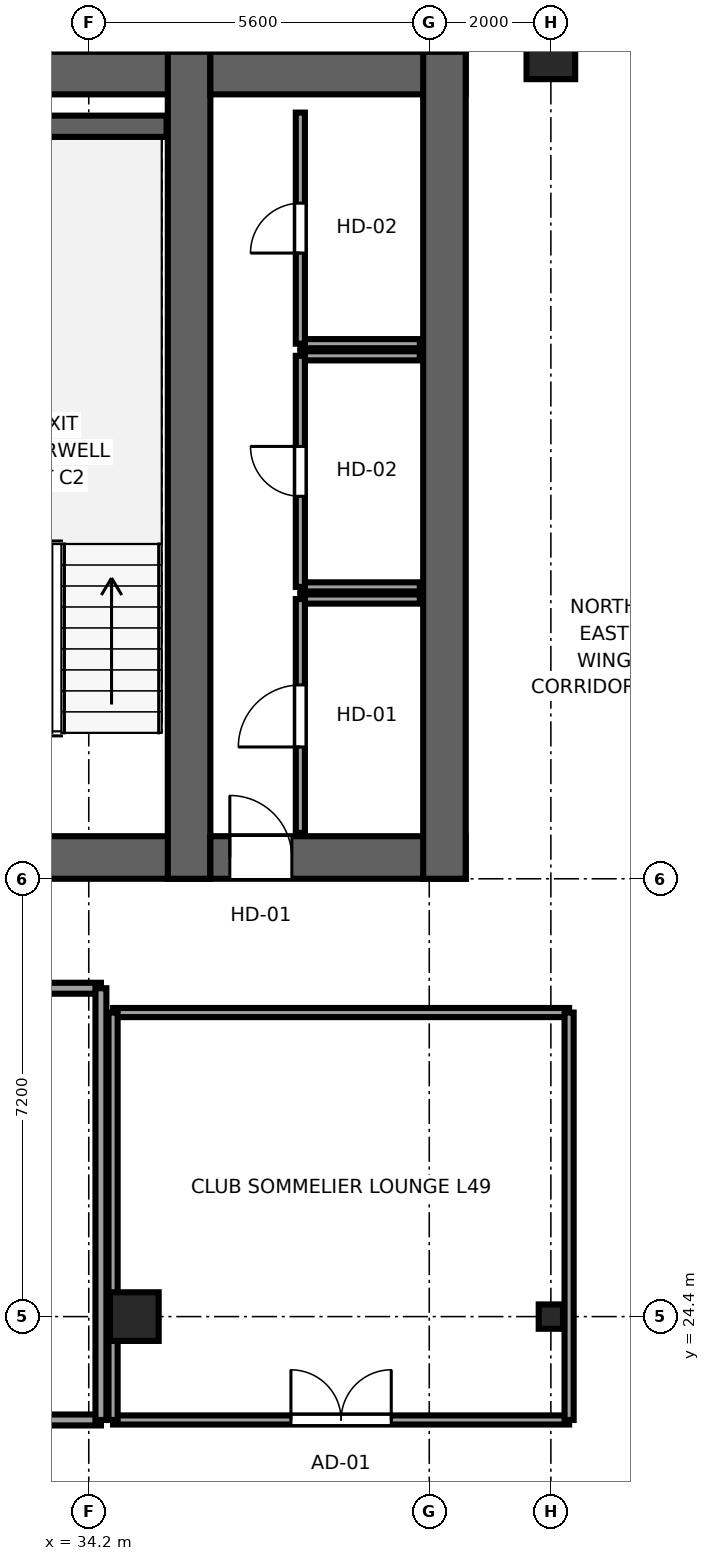
"""IFC4 building model, lengths in metres.
Left out: names, types, materials, properties, quantities, classifications, styles, units other than length and angle.
Written with IfcOpenShell. Run it as: python <this file> out.ifc"""

import sys

from ifc_helpers import new_model, si_unit, direction, frame, frame_2d, origin, origin_2d, place, context, subcontext, project, spatial, rectangle, i_section, extrude, source, transform, mapped, element, fill, save


model = new_model("IFC4")
c1 = context("Model", 3, precision=1e-05, world=origin(), true_north=direction((0.0, 1.0)))
c2 = subcontext(c1, "Body", "Model", "MODEL_VIEW")
j1 = project(units=[si_unit("LENGTHUNIT", "METRE"), si_unit("PLANEANGLEUNIT", "RADIAN")], contexts=[c1])
p1 = place(None, origin())
s1 = spatial("IfcSite", under=j1, at=p1, CompositionType="ELEMENT")
p2 = place(p1, origin())
s2 = spatial("IfcBuilding", under=s1, at=p2, CompositionType="ELEMENT")
p3 = place(p2, frame((0.0, 0.0, 187.55)))
s3 = spatial("IfcBuildingStorey", under=s2, at=p3, CompositionType="ELEMENT", Elevation=187.55)
p4 = place(p3, frame((9.8, 31.95, 0.0), z_axis=(0.0, 0.0, 1.0), x_axis=(1.0, 0.0, 0.0)))
e1 = element("IfcWall", 1, at=p4, inside=s3, PredefinedType="SHEAR", context=c2, shape_type="SweptSolid", body=[
    extrude(rectangle(XDim=26.4, YDim=0.7, at=frame_2d((13.2, 0.0))), origin(), (0.0, 0.0, 1.0), 3.55),
])
p5 = place(p4, frame((6.32, 0.0, 0.0), z_axis=(0.0, 0.0, 1.0), x_axis=(-1.0, 0.0, 0.0)))
e2 = element("IfcOpeningElement", 2, at=p5, cuts=e1, PredefinedType="OPENING", context=c2, shape_type="SweptSolid", body=[
    extrude(rectangle(XDim=1.5, YDim=2.04, at=frame_2d((0.75, 1.02))), frame((0.0, 0.36, 0.0), z_axis=(0.0, -1.0, 0.0), x_axis=(1.0, 0.0, 0.0)), (0.0, 0.0, 1.0), 0.72),
])
p6 = place(p4, frame((13.95, 0.0, 0.0), z_axis=(0.0, 0.0, 1.0), x_axis=(-1.0, 0.0, 0.0)))
e3 = element("IfcOpeningElement", 3, at=p6, cuts=e1, PredefinedType="OPENING", context=c2, shape_type="SweptSolid", body=[
    extrude(rectangle(XDim=1.5, YDim=2.04, at=frame_2d((0.75, 1.02))), frame((0.0, 0.36, 0.0), z_axis=(0.0, -1.0, 0.0), x_axis=(1.0, 0.0, 0.0)), (0.0, 0.0, 1.0), 0.72),
])
p7 = place(p4, frame((20.25, 0.0, 0.0), z_axis=(0.0, 0.0, 1.0), x_axis=(-1.0, 0.0, 0.0)))
e4 = element("IfcOpeningElement", 4, at=p7, cuts=e1, PredefinedType="OPENING", context=c2, shape_type="SweptSolid", body=[
    extrude(rectangle(XDim=1.5, YDim=2.04, at=frame_2d((0.75, 1.02))), frame((0.0, 0.36, 0.0), z_axis=(0.0, -1.0, 0.0), x_axis=(1.0, 0.0, 0.0)), (0.0, 0.0, 1.0), 0.72),
])
p8 = place(p4, frame((8.37, 0.0, 0.0), z_axis=(0.0, 0.0, 1.0), x_axis=(-1.0, 0.0, 0.0)))
e5 = element("IfcOpeningElement", 5, at=p8, cuts=e1, PredefinedType="OPENING", context=c2, shape_type="SweptSolid", body=[
    extrude(rectangle(XDim=0.82, YDim=2.01, at=frame_2d((0.41, 1.005))), frame((0.0, 0.36, 0.0), z_axis=(0.0, -1.0, 0.0), x_axis=(1.0, 0.0, 0.0)), (0.0, 0.0, 1.0), 0.72),
])
p9 = place(p3, frame((9.8, 44.85, 0.0), z_axis=(0.0, 0.0, 1.0), x_axis=(1.0, 0.0, 0.0)))
e6 = element("IfcWall", 6, at=p9, inside=s3, PredefinedType="SHEAR", context=c2, shape_type="SweptSolid", body=[
    extrude(rectangle(XDim=26.4, YDim=0.7, at=frame_2d((13.2, 0.0))), origin(), (0.0, 0.0, 1.0), 3.55),
])
p10 = place(p3, frame((35.85, 31.6, 0.0), z_axis=(0.0, 0.0, 1.0), x_axis=(0.0, 1.0, 0.0)))
e7 = element("IfcWall", 7, at=p10, inside=s3, PredefinedType="SHEAR", context=c2, shape_type="SweptSolid", body=[
    extrude(rectangle(XDim=13.6, YDim=0.7, at=frame_2d((6.8, 0.0))), origin(), (0.0, 0.0, 1.0), 3.55),
])
p11 = place(p3, frame((36.2, 31.95, 0.0), z_axis=(0.0, 0.0, 1.0), x_axis=(1.0, 0.0, 0.0)))
e8 = element("IfcWall", 8, at=p11, inside=s3, PredefinedType="SHEAR", context=c2, shape_type="SweptSolid", body=[
    extrude(rectangle(XDim=4.2, YDim=0.7, at=frame_2d((2.1, 0.0))), origin(), (0.0, 0.0, 1.0), 3.55),
])
p12 = place(p11, frame((1.34, 0.0, 0.0), z_axis=(0.0, 0.0, 1.0), x_axis=(-1.0, 0.0, 0.0)))
e9 = element("IfcOpeningElement", 9, at=p12, cuts=e8, PredefinedType="OPENING", context=c2, shape_type="SweptSolid", body=[
    extrude(rectangle(XDim=1.02, YDim=2.03, at=frame_2d((0.51, 1.015))), frame((0.0, 0.36, 0.0), z_axis=(0.0, -1.0, 0.0), x_axis=(1.0, 0.0, 0.0)), (0.0, 0.0, 1.0), 0.72),
])
p13 = place(p3, frame((36.2, 44.85, 0.0), z_axis=(0.0, 0.0, 1.0), x_axis=(1.0, 0.0, 0.0)))
e10 = element("IfcWall", 10, at=p13, inside=s3, PredefinedType="SHEAR", context=c2, shape_type="SweptSolid", body=[
    extrude(rectangle(XDim=4.2, YDim=0.7, at=frame_2d((2.1, 0.0))), origin(), (0.0, 0.0, 1.0), 3.55),
])
p14 = place(p3, frame((40.05, 31.6, 0.0), z_axis=(0.0, 0.0, 1.0), x_axis=(0.0, 1.0, 0.0)))
e11 = element("IfcWall", 11, at=p14, inside=s3, PredefinedType="SHEAR", context=c2, shape_type="SweptSolid", body=[
    extrude(rectangle(XDim=13.6, YDim=0.7, at=frame_2d((6.8, 0.0))), origin(), (0.0, 0.0, 1.0), 3.55),
])
p15 = place(p3, frame((31.88, 43.975, 0.0), z_axis=(0.0, 0.0, 1.0), x_axis=(1.0, 0.0, 0.0)))
e12 = element("IfcWall", 12, at=p15, inside=s3, PredefinedType="SHEAR", context=c2, shape_type="SweptSolid", body=[
    extrude(rectangle(XDim=3.6, YDim=0.35, at=frame_2d((1.8, 0.0))), origin(), (0.0, 0.0, 1.0), 3.55),
])
m1 = source(origin(), c2, "Body", "SweptSolid", [
    extrude(rectangle(XDim=0.8, YDim=0.8, at=origin_2d()), origin(), (0.0, 0.0, 1.0), 3.55),
])
p16 = place(p3, frame((34.95, 24.4, 0.0), z_axis=(0.0, 0.0, 1.0), x_axis=(1.0, 0.0, 0.0)))
e13 = element("IfcColumn", 13, at=p16, inside=s3, PredefinedType="COLUMN", context=c2, shape_type="MappedRepresentation", body=[
    mapped(m1, transform((0.0, 0.0, 0.0), x_axis=(1.0, 0.0, 0.0), y_axis=(0.0, 1.0, 0.0), z_axis=(0.0, 0.0, 1.0), scale=1.0)),
])
m2 = source(origin(), c2, "Body", "SweptSolid", [
    extrude(i_section(OverallWidth=0.4, OverallDepth=0.4, WebThickness=0.02, FlangeThickness=0.035, at=origin_2d()), origin(), (0.0, 0.0, 1.0), 3.55),
])
p17 = place(p3, frame((41.8, 24.4, 0.0), z_axis=(0.0, 0.0, 1.0), x_axis=(1.0, 0.0, 0.0)))
e14 = element("IfcColumn", 14, at=p17, inside=s3, PredefinedType="COLUMN", context=c2, shape_type="MappedRepresentation", body=[
    mapped(m2, transform((0.0, 0.0, 0.0), x_axis=(1.0, 0.0, 0.0), y_axis=(0.0, 1.0, 0.0), z_axis=(0.0, 0.0, 1.0), scale=1.0)),
])
p18 = place(p3, frame((41.8, 45.15, 0.0), z_axis=(0.0, 0.0, 1.0), x_axis=(1.0, 0.0, 0.0)))
e15 = element("IfcColumn", 15, at=p18, inside=s3, PredefinedType="COLUMN", context=c2, shape_type="MappedRepresentation", body=[
    mapped(m1, transform((0.0, 0.0, 0.0), x_axis=(1.0, 0.0, 0.0), y_axis=(0.0, 1.0, 0.0), z_axis=(0.0, 0.0, 1.0), scale=1.0)),
])
p19 = place(p3, frame((37.68, 36.2, 0.0), z_axis=(0.0, 0.0, 1.0), x_axis=(1.0, 0.0, 0.0)))
e16 = element("IfcWall", 16, at=p19, inside=s3, PredefinedType="PARTITIONING", context=c2, shape_type="SweptSolid", body=[
    extrude(rectangle(XDim=1.965, YDim=0.15, at=frame_2d((0.982, 0.0))), origin(), (0.0, 0.0, 1.0), 3.37),
])
p20 = place(p3, frame((37.68, 32.355, 0.0), z_axis=(0.0, 0.0, 1.0), x_axis=(0.0, 1.0, 0.0)))
e17 = element("IfcWall", 17, at=p20, inside=s3, PredefinedType="PARTITIONING", context=c2, shape_type="SweptSolid", body=[
    extrude(rectangle(XDim=3.845, YDim=0.15, at=frame_2d((1.922, 0.0))), origin(), (0.0, 0.0, 1.0), 3.37),
])
p21 = place(p20, frame((1.413, 0.0, 0.0)))
e18 = element("IfcOpeningElement", 18, at=p21, cuts=e17, PredefinedType="OPENING", context=c2, shape_type="SweptSolid", body=[
    extrude(rectangle(XDim=1.02, YDim=2.03, at=frame_2d((0.51, 1.015))), frame((0.0, 0.085, 0.0), z_axis=(0.0, -1.0, 0.0), x_axis=(1.0, 0.0, 0.0)), (0.0, 0.0, 1.0), 0.17),
])
for number, where, z_axis, x_axis in (
    (19, (37.68, 36.4, 0.0), (0.0, 0.0, 1.0), (1.0, 0.0, 0.0)),
    (20, (37.68, 40.2, 0.0), (0.0, 0.0, 1.0), (1.0, 0.0, 0.0)),
):
    element("IfcWall", number, at=place(p3, frame(where, z_axis=z_axis, x_axis=x_axis)), inside=s3, PredefinedType="PARTITIONING", context=c2, shape_type="SweptSolid", body=[
        extrude(rectangle(XDim=1.965, YDim=0.15, at=frame_2d((0.982, 0.0))), origin(), (0.0, 0.0, 1.0), 3.37),
    ])
p22 = place(p3, frame((37.68, 36.4, 0.0), z_axis=(0.0, 0.0, 1.0), x_axis=(0.0, 1.0, 0.0)))
e21 = element("IfcWall", 21, at=p22, inside=s3, PredefinedType="PARTITIONING", context=c2, shape_type="SweptSolid", body=[
    extrude(rectangle(XDim=3.8, YDim=0.15, at=frame_2d((1.9, 0.0))), origin(), (0.0, 0.0, 1.0), 3.37),
])
p23 = place(p22, frame((1.49, 0.0, 0.0)))
e22 = element("IfcOpeningElement", 22, at=p23, cuts=e21, PredefinedType="OPENING", context=c2, shape_type="SweptSolid", body=[
    extrude(rectangle(XDim=0.82, YDim=2.01, at=frame_2d((0.41, 1.005))), frame((0.0, 0.085, 0.0), z_axis=(0.0, -1.0, 0.0), x_axis=(1.0, 0.0, 0.0)), (0.0, 0.0, 1.0), 0.17),
])
p24 = place(p3, frame((37.68, 40.4, 0.0), z_axis=(0.0, 0.0, 1.0), x_axis=(1.0, 0.0, 0.0)))
e23 = element("IfcWall", 23, at=p24, inside=s3, PredefinedType="PARTITIONING", context=c2, shape_type="SweptSolid", body=[
    extrude(rectangle(XDim=1.965, YDim=0.15, at=frame_2d((0.982, 0.0))), origin(), (0.0, 0.0, 1.0), 3.37),
])
p25 = place(p3, frame((37.68, 40.4, 0.0), z_axis=(0.0, 0.0, 1.0), x_axis=(0.0, 1.0, 0.0)))
e24 = element("IfcWall", 24, at=p25, inside=s3, PredefinedType="PARTITIONING", context=c2, shape_type="SweptSolid", body=[
    extrude(rectangle(XDim=3.8, YDim=0.15, at=frame_2d((1.9, 0.0))), origin(), (0.0, 0.0, 1.0), 3.37),
])
p26 = place(p25, frame((1.49, 0.0, 0.0)))
e25 = element("IfcOpeningElement", 25, at=p26, cuts=e24, PredefinedType="OPENING", context=c2, shape_type="SweptSolid", body=[
    extrude(rectangle(XDim=0.82, YDim=2.01, at=frame_2d((0.41, 1.005))), frame((0.0, 0.085, 0.0), z_axis=(0.0, -1.0, 0.0), x_axis=(1.0, 0.0, 0.0)), (0.0, 0.0, 1.0), 0.17),
])
p27 = place(p3, frame((27.1, 22.7, 0.0), z_axis=(0.0, 0.0, 1.0), x_axis=(1.0, 0.0, 0.0)))
e26 = element("IfcWall", 26, at=p27, inside=s3, PredefinedType="PARTITIONING", context=c2, shape_type="SweptSolid", body=[
    extrude(rectangle(XDim=7.3, YDim=0.18, at=frame_2d((3.65, 0.0))), origin(), (0.0, 0.0, 1.0), 3.37),
])
p28 = place(p27, frame((2.825, 0.0, 0.0)))
e27 = element("IfcOpeningElement", 27, at=p28, cuts=e26, PredefinedType="OPENING", context=c2, shape_type="SweptSolid", body=[
    extrude(rectangle(XDim=1.65, YDim=2.15, at=frame_2d((0.825, 1.075))), frame((0.0, 0.1, 0.0), z_axis=(0.0, -1.0, 0.0), x_axis=(1.0, 0.0, 0.0)), (0.0, 0.0, 1.0), 0.2),
])
p29 = place(p3, frame((27.1, 29.8, 0.0), z_axis=(0.0, 0.0, 1.0), x_axis=(1.0, 0.0, 0.0)))
e28 = element("IfcWall", 28, at=p29, inside=s3, PredefinedType="PARTITIONING", context=c2, shape_type="SweptSolid", body=[
    extrude(rectangle(XDim=7.3, YDim=0.18, at=frame_2d((3.65, 0.0))), origin(), (0.0, 0.0, 1.0), 3.37),
])
p30 = place(p3, frame((34.4, 22.7, 0.0), z_axis=(0.0, 0.0, 1.0), x_axis=(0.0, 1.0, 0.0)))
e29 = element("IfcWall", 29, at=p30, inside=s3, PredefinedType="PARTITIONING", context=c2, shape_type="SweptSolid", body=[
    extrude(rectangle(XDim=7.1, YDim=0.18, at=frame_2d((3.55, 0.0))), origin(), (0.0, 0.0, 1.0), 3.37),
])
p31 = place(p3, frame((34.6, 22.7, 0.0), z_axis=(0.0, 0.0, 1.0), x_axis=(1.0, 0.0, 0.0)))
e30 = element("IfcWall", 30, at=p31, inside=s3, PredefinedType="PARTITIONING", context=c2, shape_type="SweptSolid", body=[
    extrude(rectangle(XDim=7.5, YDim=0.15, at=frame_2d((3.75, 0.0))), origin(), (0.0, 0.0, 1.0), 3.37),
])
p32 = place(p31, frame((2.925, 0.0, 0.0)))
e31 = element("IfcOpeningElement", 31, at=p32, cuts=e30, PredefinedType="OPENING", context=c2, shape_type="SweptSolid", body=[
    extrude(rectangle(XDim=1.65, YDim=2.15, at=frame_2d((0.825, 1.075))), frame((0.0, 0.085, 0.0), z_axis=(0.0, -1.0, 0.0), x_axis=(1.0, 0.0, 0.0)), (0.0, 0.0, 1.0), 0.17),
])
p33 = place(p3, frame((34.6, 29.4, 0.0), z_axis=(0.0, 0.0, 1.0), x_axis=(1.0, 0.0, 0.0)))
e32 = element("IfcWall", 32, at=p33, inside=s3, PredefinedType="PARTITIONING", context=c2, shape_type="SweptSolid", body=[
    extrude(rectangle(XDim=7.5, YDim=0.15, at=frame_2d((3.75, 0.0))), origin(), (0.0, 0.0, 1.0), 3.37),
])
p34 = place(p3, frame((34.6, 22.7, 0.0), z_axis=(0.0, 0.0, 1.0), x_axis=(0.0, 1.0, 0.0)))
e33 = element("IfcWall", 33, at=p34, inside=s3, PredefinedType="PARTITIONING", context=c2, shape_type="SweptSolid", body=[
    extrude(rectangle(XDim=6.7, YDim=0.15, at=frame_2d((3.35, 0.0))), origin(), (0.0, 0.0, 1.0), 3.37),
])
p35 = place(p3, frame((42.1, 22.7, 0.0), z_axis=(0.0, 0.0, 1.0), x_axis=(0.0, 1.0, 0.0)))
e34 = element("IfcWall", 34, at=p35, inside=s3, PredefinedType="PARTITIONING", context=c2, shape_type="SweptSolid", body=[
    extrude(rectangle(XDim=6.7, YDim=0.15, at=frame_2d((3.35, 0.0))), origin(), (0.0, 0.0, 1.0), 2.16),
])
m3 = source(origin(), c2, "Body", "SweptSolid", [
    extrude(rectangle(XDim=1.02, YDim=2.03, at=frame_2d((0.51, 1.015))), frame((0.0, 0.025, 0.0), z_axis=(0.0, -1.0, 0.0), x_axis=(1.0, 0.0, 0.0)), (0.0, 0.0, 1.0), 0.05),
])
p36 = place(p12, origin())
e35 = element("IfcDoor", 35, at=p36, inside=s3, OperationType="SINGLE_SWING_LEFT", PredefinedType="DOOR", context=c2, shape_type="MappedRepresentation", body=[
    mapped(m3, transform((0.0, 0.0, 0.0), x_axis=(1.0, 0.0, 0.0), y_axis=(0.0, 1.0, 0.0), z_axis=(0.0, 0.0, 1.0), scale=1.0)),
])
fill(e9, e35)
p37 = place(p21, origin())
e36 = element("IfcDoor", 36, at=p37, inside=s3, OperationType="SINGLE_SWING_LEFT", PredefinedType="DOOR", context=c2, shape_type="MappedRepresentation", body=[
    mapped(m3, transform((0.0, 0.0, 0.0), x_axis=(1.0, 0.0, 0.0), y_axis=(0.0, 1.0, 0.0), z_axis=(0.0, 0.0, 1.0), scale=1.0)),
])
fill(e18, e36)
m4 = source(origin(), c2, "Body", "SweptSolid", [
    extrude(rectangle(XDim=0.82, YDim=2.01, at=frame_2d((0.41, 1.005))), frame((0.0, 0.025, 0.0), z_axis=(0.0, -1.0, 0.0), x_axis=(1.0, 0.0, 0.0)), (0.0, 0.0, 1.0), 0.05),
])
p38 = place(p23, origin())
e37 = element("IfcDoor", 37, at=p38, inside=s3, OperationType="SINGLE_SWING_RIGHT", PredefinedType="DOOR", context=c2, shape_type="MappedRepresentation", body=[
    mapped(m4, transform((0.0, 0.0, 0.0), x_axis=(1.0, 0.0, 0.0), y_axis=(0.0, 1.0, 0.0), z_axis=(0.0, 0.0, 1.0), scale=1.0)),
])
fill(e22, e37)
p39 = place(p26, origin())
e38 = element("IfcDoor", 38, at=p39, inside=s3, OperationType="SINGLE_SWING_LEFT", PredefinedType="DOOR", context=c2, shape_type="MappedRepresentation", body=[
    mapped(m4, transform((0.0, 0.0, 0.0), x_axis=(1.0, 0.0, 0.0), y_axis=(0.0, 1.0, 0.0), z_axis=(0.0, 0.0, 1.0), scale=1.0)),
])
fill(e25, e38)
m5 = source(origin(), c2, "Body", "SweptSolid", [
    extrude(rectangle(XDim=1.65, YDim=2.15, at=frame_2d((0.825, 1.075))), frame((0.0, 0.025, 0.0), z_axis=(0.0, -1.0, 0.0), x_axis=(1.0, 0.0, 0.0)), (0.0, 0.0, 1.0), 0.05),
])
p40 = place(p32, origin())
e39 = element("IfcDoor", 39, at=p40, inside=s3, OperationType="DOUBLE_DOOR_SINGLE_SWING", PredefinedType="DOOR", context=c2, shape_type="MappedRepresentation", body=[
    mapped(m5, transform((0.0, 0.0, 0.0), x_axis=(1.0, 0.0, 0.0), y_axis=(0.0, 1.0, 0.0), z_axis=(0.0, 0.0, 1.0), scale=1.0)),
])
fill(e31, e39)
save(model, sys.argv[1])
